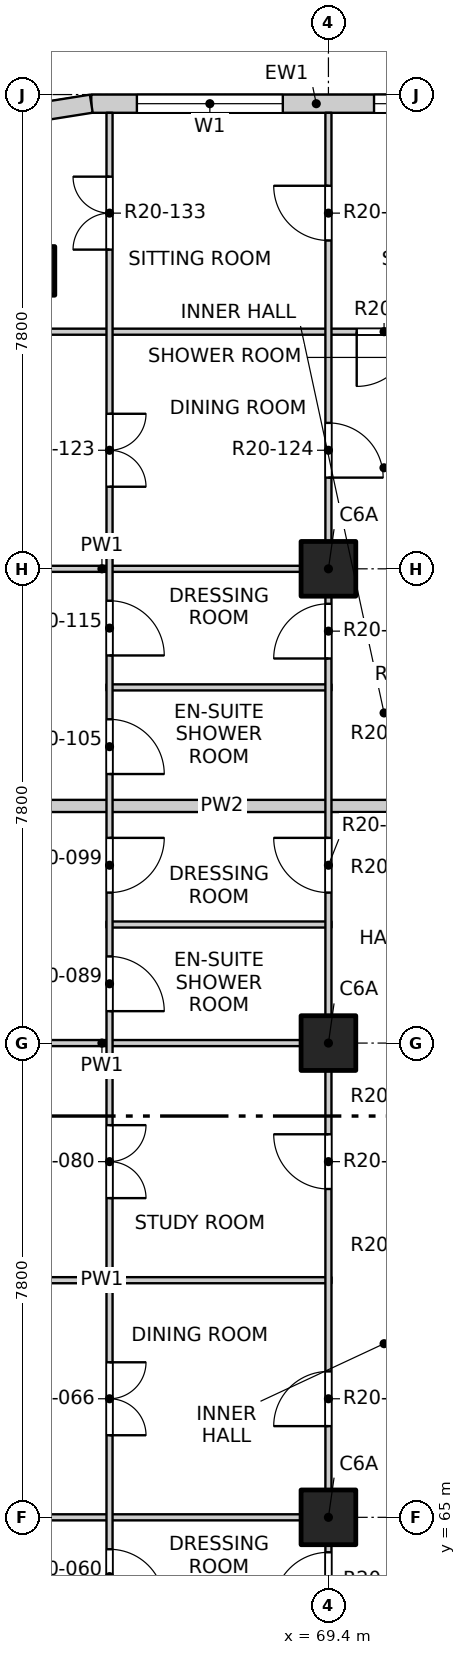
"""IFC4 building model, lengths in metres.
Left out: names, types, materials, properties, quantities, classifications, styles, units other than length and angle.
Written with IfcOpenShell. Run it as: python <this file> out.ifc"""

import sys

from ifc_helpers import new_model, si_unit, direction, frame, frame_2d, origin, origin_2d, place, context, subcontext, project, spatial, rectangle, extrude, element, fill, save


model = new_model("IFC4")
c1 = context("Model", 3, precision=1e-05, world=origin(), true_north=direction((0.0, 1.0)))
c2 = subcontext(c1, "Body", "Model", "MODEL_VIEW")
j1 = project(units=[si_unit("LENGTHUNIT", "METRE"), si_unit("PLANEANGLEUNIT", "RADIAN")], contexts=[c1])
p1 = place(None, origin())
s1 = spatial("IfcSite", under=j1, at=p1, CompositionType="ELEMENT")
p2 = place(p1, origin())
s2 = spatial("IfcBuilding", under=s1, at=p2, CompositionType="ELEMENT")
p3 = place(p2, frame((0.0, 0.0, 210.9)))
s3 = spatial("IfcBuildingStorey", under=s2, at=p3, CompositionType="ELEMENT", Elevation=210.9)
p4 = place(p3, frame((64.5, 85.5, -0.25), z_axis=(0.0, 0.0, 1.0), x_axis=(1.0, 0.0, 0.0)))
e1 = element("IfcColumn", 1, at=p4, inside=s3, PredefinedType="COLUMN", context=c2, shape_type="SweptSolid", body=[
    extrude(rectangle(XDim=0.8, YDim=0.8, at=origin_2d()), origin(), (0.0, 0.0, 1.0), 3.4),
])
for number, where, z_axis, x_axis in (
    (2, (69.4, 65.0, -0.25), (0.0, 0.0, 1.0), (1.0, 0.0, 0.0)),
    (3, (69.4, 72.8, -0.25), (0.0, 0.0, 1.0), (1.0, 0.0, 0.0)),
    (4, (69.4, 80.6, -0.25), (0.0, 0.0, 1.0), (1.0, 0.0, 0.0)),
):
    element("IfcColumn", number, at=place(p3, frame(where, z_axis=z_axis, x_axis=x_axis)), inside=s3, PredefinedType="COLUMN", context=c2, shape_type="SweptSolid", body=[
        extrude(rectangle(XDim=0.9, YDim=0.9, at=origin_2d()), origin(), (0.0, 0.0, 1.0), 3.4),
    ])
p5 = place(p3, frame((65.5, 88.25, 0.0), z_axis=(0.0, 0.0, 1.0), x_axis=(1.0, 0.0, 0.0)))
e5 = element("IfcWall", 5, at=p5, inside=s3, PredefinedType="SOLIDWALL", context=c2, shape_type="SweptSolid", body=[
    extrude(rectangle(XDim=7.4, YDim=0.3, at=frame_2d((3.7, 0.0))), origin(), (0.0, 0.0, 1.0), 2.7),
])
p6 = place(p5, frame((0.75, 0.0, 0.9)))
e6 = element("IfcOpeningElement", 6, at=p6, cuts=e5, PredefinedType="OPENING", context=c2, shape_type="SweptSolid", body=[
    extrude(rectangle(XDim=2.4, YDim=1.8, at=frame_2d((1.2, 0.9))), frame((0.0, 0.16, 0.0), z_axis=(0.0, -1.0, 0.0), x_axis=(1.0, 0.0, 0.0)), (0.0, 0.0, 1.0), 0.32),
])
p7 = place(p5, frame((4.65, 0.0, 0.9)))
e7 = element("IfcOpeningElement", 7, at=p7, cuts=e5, PredefinedType="OPENING", context=c2, shape_type="SweptSolid", body=[
    extrude(rectangle(XDim=2.4, YDim=1.8, at=frame_2d((1.2, 0.9))), frame((0.0, 0.16, 0.0), z_axis=(0.0, -1.0, 0.0), x_axis=(1.0, 0.0, 0.0)), (0.0, 0.0, 1.0), 0.32),
])
p8 = place(p3, frame((65.5, 88.25, 0.0), z_axis=(0.0, 0.0, 1.0), x_axis=(-0.987678452879, -0.156496880861, 0.0)))
e8 = element("IfcWall", 8, at=p8, inside=s3, PredefinedType="SOLIDWALL", context=c2, shape_type="SweptSolid", body=[
    extrude(rectangle(XDim=1.173, YDim=0.3, at=frame_2d((0.586, 0.0))), origin(), (0.0, 0.0, 1.0), 2.7),
])
p9 = place(p3, frame((61.9, 65.0, 0.0), z_axis=(0.0, 0.0, 1.0), x_axis=(1.0, 0.0, 0.0)))
e9 = element("IfcWall", 9, at=p9, inside=s3, PredefinedType="PARTITIONING", context=c2, shape_type="SweptSolid", body=[
    extrude(rectangle(XDim=7.55, YDim=0.1, at=frame_2d((3.775, 0.0))), origin(), (0.0, 0.0, 1.0), 3.15),
])
p10 = place(p3, frame((61.9, 68.9, 0.0), z_axis=(0.0, 0.0, 1.0), x_axis=(1.0, 0.0, 0.0)))
e10 = element("IfcWall", 10, at=p10, inside=s3, PredefinedType="PARTITIONING", context=c2, shape_type="SweptSolid", body=[
    extrude(rectangle(XDim=7.55, YDim=0.1, at=frame_2d((3.775, 0.0))), origin(), (0.0, 0.0, 1.0), 2.55),
])
p11 = place(p3, frame((61.9, 72.8, 0.0), z_axis=(0.0, 0.0, 1.0), x_axis=(1.0, 0.0, 0.0)))
e11 = element("IfcWall", 11, at=p11, inside=s3, PredefinedType="PARTITIONING", context=c2, shape_type="SweptSolid", body=[
    extrude(rectangle(XDim=7.55, YDim=0.1, at=frame_2d((3.775, 0.0))), origin(), (0.0, 0.0, 1.0), 3.15),
])
p12 = place(p3, frame((65.75, 74.75, 0.0), z_axis=(0.0, 0.0, 1.0), x_axis=(1.0, 0.0, 0.0)))
e12 = element("IfcWall", 12, at=p12, inside=s3, PredefinedType="PARTITIONING", context=c2, shape_type="SweptSolid", body=[
    extrude(rectangle(XDim=3.7, YDim=0.1, at=frame_2d((1.85, 0.0))), origin(), (0.0, 0.0, 1.0), 3.15),
])
p13 = place(p3, frame((61.9, 76.7, 0.0), z_axis=(0.0, 0.0, 1.0), x_axis=(1.0, 0.0, 0.0)))
e13 = element("IfcWall", 13, at=p13, inside=s3, PredefinedType="PARTITIONING", context=c2, shape_type="SweptSolid", body=[
    extrude(rectangle(XDim=11.5, YDim=0.2, at=frame_2d((5.75, 0.0))), origin(), (0.0, 0.0, 1.0), 2.55),
])
p14 = place(p3, frame((65.75, 78.65, 0.0), z_axis=(0.0, 0.0, 1.0), x_axis=(1.0, 0.0, 0.0)))
e14 = element("IfcWall", 14, at=p14, inside=s3, PredefinedType="PARTITIONING", context=c2, shape_type="SweptSolid", body=[
    extrude(rectangle(XDim=3.7, YDim=0.1, at=frame_2d((1.85, 0.0))), origin(), (0.0, 0.0, 1.0), 3.15),
])
p15 = place(p3, frame((61.9, 80.6, 0.0), z_axis=(0.0, 0.0, 1.0), x_axis=(1.0, 0.0, 0.0)))
e15 = element("IfcWall", 15, at=p15, inside=s3, PredefinedType="PARTITIONING", context=c2, shape_type="SweptSolid", body=[
    extrude(rectangle(XDim=7.55, YDim=0.1, at=frame_2d((3.775, 0.0))), origin(), (0.0, 0.0, 1.0), 3.15),
])
p16 = place(p3, frame((61.9, 84.5, 0.0), z_axis=(0.0, 0.0, 1.0), x_axis=(1.0, 0.0, 0.0)))
e16 = element("IfcWall", 16, at=p16, inside=s3, PredefinedType="PARTITIONING", context=c2, shape_type="SweptSolid", body=[
    extrude(rectangle(XDim=11.5, YDim=0.1, at=frame_2d((5.75, 0.0))), origin(), (0.0, 0.0, 1.0), 3.15),
])
p17 = place(p16, frame((7.965, 0.0, 0.0)))
e17 = element("IfcOpeningElement", 17, at=p17, cuts=e16, PredefinedType="OPENING", context=c2, shape_type="SweptSolid", body=[
    extrude(rectangle(XDim=0.9, YDim=2.1, at=frame_2d((0.45, 1.05))), frame((0.0, 0.06, 0.0), z_axis=(0.0, -1.0, 0.0), x_axis=(1.0, 0.0, 0.0)), (0.0, 0.0, 1.0), 0.12),
])
p18 = place(p3, frame((65.8, 61.2, 0.0), z_axis=(0.0, 0.0, 1.0), x_axis=(0.0, 1.0, 0.0)))
e18 = element("IfcWall", 18, at=p18, inside=s3, PredefinedType="PARTITIONING", context=c2, shape_type="SweptSolid", body=[
    extrude(rectangle(XDim=26.9, YDim=0.1, at=frame_2d((13.45, 0.0))), origin(), (0.0, 0.0, 1.0), 3.15),
])
p19 = place(p18, frame((0.425, 0.0, 0.0)))
e19 = element("IfcOpeningElement", 19, at=p19, cuts=e18, PredefinedType="OPENING", context=c2, shape_type="SweptSolid", body=[
    extrude(rectangle(XDim=0.9, YDim=2.1, at=frame_2d((0.45, 1.05))), frame((0.0, 0.06, 0.0), z_axis=(0.0, -1.0, 0.0), x_axis=(1.0, 0.0, 0.0)), (0.0, 0.0, 1.0), 0.12),
])
p20 = place(p18, frame((2.375, 0.0, 0.0)))
e20 = element("IfcOpeningElement", 20, at=p20, cuts=e18, PredefinedType="OPENING", context=c2, shape_type="SweptSolid", body=[
    extrude(rectangle(XDim=0.9, YDim=2.1, at=frame_2d((0.45, 1.05))), frame((0.0, 0.06, 0.0), z_axis=(0.0, -1.0, 0.0), x_axis=(1.0, 0.0, 0.0)), (0.0, 0.0, 1.0), 0.12),
])
p21 = place(p18, frame((5.15, 0.0, 0.0)))
e21 = element("IfcOpeningElement", 21, at=p21, cuts=e18, PredefinedType="OPENING", context=c2, shape_type="SweptSolid", body=[
    extrude(rectangle(XDim=1.2, YDim=2.1, at=frame_2d((0.6, 1.05))), frame((0.0, 0.06, 0.0), z_axis=(0.0, -1.0, 0.0), x_axis=(1.0, 0.0, 0.0)), (0.0, 0.0, 1.0), 0.12),
])
p22 = place(p18, frame((9.05, 0.0, 0.0)))
e22 = element("IfcOpeningElement", 22, at=p22, cuts=e18, PredefinedType="OPENING", context=c2, shape_type="SweptSolid", body=[
    extrude(rectangle(XDim=1.2, YDim=2.1, at=frame_2d((0.6, 1.05))), frame((0.0, 0.06, 0.0), z_axis=(0.0, -1.0, 0.0), x_axis=(1.0, 0.0, 0.0)), (0.0, 0.0, 1.0), 0.12),
])
p23 = place(p18, frame((12.125, 0.0, 0.0)))
e23 = element("IfcOpeningElement", 23, at=p23, cuts=e18, PredefinedType="OPENING", context=c2, shape_type="SweptSolid", body=[
    extrude(rectangle(XDim=0.9, YDim=2.1, at=frame_2d((0.45, 1.05))), frame((0.0, 0.06, 0.0), z_axis=(0.0, -1.0, 0.0), x_axis=(1.0, 0.0, 0.0)), (0.0, 0.0, 1.0), 0.12),
])
p24 = place(p18, frame((14.075, 0.0, 0.0)))
e24 = element("IfcOpeningElement", 24, at=p24, cuts=e18, PredefinedType="OPENING", context=c2, shape_type="SweptSolid", body=[
    extrude(rectangle(XDim=0.9, YDim=2.1, at=frame_2d((0.45, 1.05))), frame((0.0, 0.06, 0.0), z_axis=(0.0, -1.0, 0.0), x_axis=(1.0, 0.0, 0.0)), (0.0, 0.0, 1.0), 0.12),
])
p25 = place(p18, frame((16.025, 0.0, 0.0)))
e25 = element("IfcOpeningElement", 25, at=p25, cuts=e18, PredefinedType="OPENING", context=c2, shape_type="SweptSolid", body=[
    extrude(rectangle(XDim=0.9, YDim=2.1, at=frame_2d((0.45, 1.05))), frame((0.0, 0.06, 0.0), z_axis=(0.0, -1.0, 0.0), x_axis=(1.0, 0.0, 0.0)), (0.0, 0.0, 1.0), 0.12),
])
p26 = place(p18, frame((17.975, 0.0, 0.0)))
e26 = element("IfcOpeningElement", 26, at=p26, cuts=e18, PredefinedType="OPENING", context=c2, shape_type="SweptSolid", body=[
    extrude(rectangle(XDim=0.9, YDim=2.1, at=frame_2d((0.45, 1.05))), frame((0.0, 0.06, 0.0), z_axis=(0.0, -1.0, 0.0), x_axis=(1.0, 0.0, 0.0)), (0.0, 0.0, 1.0), 0.12),
])
p27 = place(p18, frame((20.75, 0.0, 0.0)))
e27 = element("IfcOpeningElement", 27, at=p27, cuts=e18, PredefinedType="OPENING", context=c2, shape_type="SweptSolid", body=[
    extrude(rectangle(XDim=1.2, YDim=2.1, at=frame_2d((0.6, 1.05))), frame((0.0, 0.06, 0.0), z_axis=(0.0, -1.0, 0.0), x_axis=(1.0, 0.0, 0.0)), (0.0, 0.0, 1.0), 0.12),
])
p28 = place(p18, frame((24.65, 0.0, 0.0)))
e28 = element("IfcOpeningElement", 28, at=p28, cuts=e18, PredefinedType="OPENING", context=c2, shape_type="SweptSolid", body=[
    extrude(rectangle(XDim=1.2, YDim=2.1, at=frame_2d((0.6, 1.05))), frame((0.0, 0.06, 0.0), z_axis=(0.0, -1.0, 0.0), x_axis=(1.0, 0.0, 0.0)), (0.0, 0.0, 1.0), 0.12),
])
p29 = place(p3, frame((69.4, 41.9, 0.0), z_axis=(0.0, 0.0, 1.0), x_axis=(0.0, 1.0, 0.0)))
e29 = element("IfcWall", 29, at=p29, inside=s3, PredefinedType="PARTITIONING", context=c2, shape_type="SweptSolid", body=[
    extrude(rectangle(XDim=46.2, YDim=0.1, at=frame_2d((23.1, 0.0))), origin(), (0.0, 0.0, 1.0), 3.15),
])
p30 = place(p29, frame((1.2, 0.0, 0.0)))
e30 = element("IfcOpeningElement", 30, at=p30, cuts=e29, PredefinedType="OPENING", context=c2, shape_type="SweptSolid", body=[
    extrude(rectangle(XDim=0.9, YDim=2.1, at=frame_2d((0.45, 1.05))), frame((0.0, 0.06, 0.0), z_axis=(0.0, -1.0, 0.0), x_axis=(1.0, 0.0, 0.0)), (0.0, 0.0, 1.0), 0.12),
])
p31 = place(p29, frame((5.1, 0.0, 0.0)))
e31 = element("IfcOpeningElement", 31, at=p31, cuts=e29, PredefinedType="OPENING", context=c2, shape_type="SweptSolid", body=[
    extrude(rectangle(XDim=0.9, YDim=2.1, at=frame_2d((0.45, 1.05))), frame((0.0, 0.06, 0.0), z_axis=(0.0, -1.0, 0.0), x_axis=(1.0, 0.0, 0.0)), (0.0, 0.0, 1.0), 0.12),
])
p32 = place(p29, frame((9.975, 0.0, 0.0)))
e32 = element("IfcOpeningElement", 32, at=p32, cuts=e29, PredefinedType="OPENING", context=c2, shape_type="SweptSolid", body=[
    extrude(rectangle(XDim=0.9, YDim=2.1, at=frame_2d((0.45, 1.05))), frame((0.0, 0.06, 0.0), z_axis=(0.0, -1.0, 0.0), x_axis=(1.0, 0.0, 0.0)), (0.0, 0.0, 1.0), 0.12),
])
p33 = place(p29, frame((12.9, 0.0, 0.0)))
e33 = element("IfcOpeningElement", 33, at=p33, cuts=e29, PredefinedType="OPENING", context=c2, shape_type="SweptSolid", body=[
    extrude(rectangle(XDim=0.9, YDim=2.1, at=frame_2d((0.45, 1.05))), frame((0.0, 0.06, 0.0), z_axis=(0.0, -1.0, 0.0), x_axis=(1.0, 0.0, 0.0)), (0.0, 0.0, 1.0), 0.12),
])
p34 = place(p29, frame((17.775, 0.0, 0.0)))
e34 = element("IfcOpeningElement", 34, at=p34, cuts=e29, PredefinedType="OPENING", context=c2, shape_type="SweptSolid", body=[
    extrude(rectangle(XDim=0.9, YDim=2.1, at=frame_2d((0.45, 1.05))), frame((0.0, 0.06, 0.0), z_axis=(0.0, -1.0, 0.0), x_axis=(1.0, 0.0, 0.0)), (0.0, 0.0, 1.0), 0.12),
])
p35 = place(p29, frame((21.625, 0.0, 0.0)))
e35 = element("IfcOpeningElement", 35, at=p35, cuts=e29, PredefinedType="OPENING", context=c2, shape_type="SweptSolid", body=[
    extrude(rectangle(XDim=0.9, YDim=2.1, at=frame_2d((0.45, 1.05))), frame((0.0, 0.06, 0.0), z_axis=(0.0, -1.0, 0.0), x_axis=(1.0, 0.0, 0.0)), (0.0, 0.0, 1.0), 0.12),
])
p36 = place(p29, frame((24.6, 0.0, 0.0)))
e36 = element("IfcOpeningElement", 36, at=p36, cuts=e29, PredefinedType="OPENING", context=c2, shape_type="SweptSolid", body=[
    extrude(rectangle(XDim=0.9, YDim=2.1, at=frame_2d((0.45, 1.05))), frame((0.0, 0.06, 0.0), z_axis=(0.0, -1.0, 0.0), x_axis=(1.0, 0.0, 0.0)), (0.0, 0.0, 1.0), 0.12),
])
p37 = place(p29, frame((28.5, 0.0, 0.0)))
e37 = element("IfcOpeningElement", 37, at=p37, cuts=e29, PredefinedType="OPENING", context=c2, shape_type="SweptSolid", body=[
    extrude(rectangle(XDim=0.9, YDim=2.1, at=frame_2d((0.45, 1.05))), frame((0.0, 0.06, 0.0), z_axis=(0.0, -1.0, 0.0), x_axis=(1.0, 0.0, 0.0)), (0.0, 0.0, 1.0), 0.12),
])
p38 = place(p29, frame((33.375, 0.0, 0.0)))
e38 = element("IfcOpeningElement", 38, at=p38, cuts=e29, PredefinedType="OPENING", context=c2, shape_type="SweptSolid", body=[
    extrude(rectangle(XDim=0.9, YDim=2.1, at=frame_2d((0.45, 1.05))), frame((0.0, 0.06, 0.0), z_axis=(0.0, -1.0, 0.0), x_axis=(1.0, 0.0, 0.0)), (0.0, 0.0, 1.0), 0.12),
])
p39 = place(p29, frame((37.225, 0.0, 0.0)))
e39 = element("IfcOpeningElement", 39, at=p39, cuts=e29, PredefinedType="OPENING", context=c2, shape_type="SweptSolid", body=[
    extrude(rectangle(XDim=0.9, YDim=2.1, at=frame_2d((0.45, 1.05))), frame((0.0, 0.06, 0.0), z_axis=(0.0, -1.0, 0.0), x_axis=(1.0, 0.0, 0.0)), (0.0, 0.0, 1.0), 0.12),
])
p40 = place(p29, frame((40.2, 0.0, 0.0)))
e40 = element("IfcOpeningElement", 40, at=p40, cuts=e29, PredefinedType="OPENING", context=c2, shape_type="SweptSolid", body=[
    extrude(rectangle(XDim=0.9, YDim=2.1, at=frame_2d((0.45, 1.05))), frame((0.0, 0.06, 0.0), z_axis=(0.0, -1.0, 0.0), x_axis=(1.0, 0.0, 0.0)), (0.0, 0.0, 1.0), 0.12),
])
p41 = place(p29, frame((44.1, 0.0, 0.0)))
e41 = element("IfcOpeningElement", 41, at=p41, cuts=e29, PredefinedType="OPENING", context=c2, shape_type="SweptSolid", body=[
    extrude(rectangle(XDim=0.9, YDim=2.1, at=frame_2d((0.45, 1.05))), frame((0.0, 0.06, 0.0), z_axis=(0.0, -1.0, 0.0), x_axis=(1.0, 0.0, 0.0)), (0.0, 0.0, 1.0), 0.12),
])
p42 = place(p6, origin())
e42 = element("IfcWindow", 42, at=p42, inside=s3, PartitioningType="DOUBLE_PANEL_VERTICAL", PredefinedType="WINDOW", context=c2, shape_type="SweptSolid", body=[
    extrude(rectangle(XDim=2.4, YDim=1.8, at=frame_2d((1.2, 0.9))), frame((0.0, 0.03, 0.0), z_axis=(0.0, -1.0, 0.0), x_axis=(1.0, 0.0, 0.0)), (0.0, 0.0, 1.0), 0.06),
])
fill(e6, e42)
p43 = place(p7, origin())
e43 = element("IfcWindow", 43, at=p43, inside=s3, PartitioningType="DOUBLE_PANEL_VERTICAL", PredefinedType="WINDOW", context=c2, shape_type="SweptSolid", body=[
    extrude(rectangle(XDim=2.4, YDim=1.8, at=frame_2d((1.2, 0.9))), frame((0.0, 0.03, 0.0), z_axis=(0.0, -1.0, 0.0), x_axis=(1.0, 0.0, 0.0)), (0.0, 0.0, 1.0), 0.06),
])
fill(e7, e43)
p44 = place(p35, origin())
e44 = element("IfcDoor", 44, at=p44, inside=s3, OperationType="SINGLE_SWING_LEFT", PredefinedType="DOOR", context=c2, shape_type="SweptSolid", body=[
    extrude(rectangle(XDim=0.9, YDim=2.1, at=frame_2d((0.45, 1.05))), frame((0.0, 0.025, 0.0), z_axis=(0.0, -1.0, 0.0), x_axis=(1.0, 0.0, 0.0)), (0.0, 0.0, 1.0), 0.05),
])
fill(e35, e44)
p45 = place(p20, origin())
e45 = element("IfcDoor", 45, at=p45, inside=s3, OperationType="SINGLE_SWING_RIGHT", PredefinedType="DOOR", context=c2, shape_type="SweptSolid", body=[
    extrude(rectangle(XDim=0.9, YDim=2.1, at=frame_2d((0.45, 1.05))), frame((0.0, 0.025, 0.0), z_axis=(0.0, -1.0, 0.0), x_axis=(1.0, 0.0, 0.0)), (0.0, 0.0, 1.0), 0.05),
])
fill(e20, e45)
p46 = place(p21, origin())
e46 = element("IfcDoor", 46, at=p46, inside=s3, OperationType="DOUBLE_DOOR_SINGLE_SWING", PredefinedType="DOOR", context=c2, shape_type="SweptSolid", body=[
    extrude(rectangle(XDim=1.2, YDim=2.1, at=frame_2d((0.6, 1.05))), frame((0.0, 0.025, 0.0), z_axis=(0.0, -1.0, 0.0), x_axis=(1.0, 0.0, 0.0)), (0.0, 0.0, 1.0), 0.05),
])
fill(e21, e46)
p47 = place(p36, origin())
e47 = element("IfcDoor", 47, at=p47, inside=s3, OperationType="SINGLE_SWING_LEFT", PredefinedType="DOOR", context=c2, shape_type="SweptSolid", body=[
    extrude(rectangle(XDim=0.9, YDim=2.1, at=frame_2d((0.45, 1.05))), frame((0.0, 0.025, 0.0), z_axis=(0.0, -1.0, 0.0), x_axis=(1.0, 0.0, 0.0)), (0.0, 0.0, 1.0), 0.05),
])
fill(e36, e47)
p48 = place(p22, origin())
e48 = element("IfcDoor", 48, at=p48, inside=s3, OperationType="DOUBLE_DOOR_SINGLE_SWING", PredefinedType="DOOR", context=c2, shape_type="SweptSolid", body=[
    extrude(rectangle(XDim=1.2, YDim=2.1, at=frame_2d((0.6, 1.05))), frame((0.0, 0.025, 0.0), z_axis=(0.0, -1.0, 0.0), x_axis=(1.0, 0.0, 0.0)), (0.0, 0.0, 1.0), 0.05),
])
fill(e22, e48)
p49 = place(p37, origin())
e49 = element("IfcDoor", 49, at=p49, inside=s3, OperationType="SINGLE_SWING_RIGHT", PredefinedType="DOOR", context=c2, shape_type="SweptSolid", body=[
    extrude(rectangle(XDim=0.9, YDim=2.1, at=frame_2d((0.45, 1.05))), frame((0.0, 0.025, 0.0), z_axis=(0.0, -1.0, 0.0), x_axis=(1.0, 0.0, 0.0)), (0.0, 0.0, 1.0), 0.05),
])
fill(e37, e49)
p50 = place(p23, origin())
e50 = element("IfcDoor", 50, at=p50, inside=s3, OperationType="SINGLE_SWING_RIGHT", PredefinedType="DOOR", context=c2, shape_type="SweptSolid", body=[
    extrude(rectangle(XDim=0.9, YDim=2.1, at=frame_2d((0.45, 1.05))), frame((0.0, 0.025, 0.0), z_axis=(0.0, -1.0, 0.0), x_axis=(1.0, 0.0, 0.0)), (0.0, 0.0, 1.0), 0.05),
])
fill(e23, e50)
p51 = place(p24, origin())
e51 = element("IfcDoor", 51, at=p51, inside=s3, OperationType="SINGLE_SWING_LEFT", PredefinedType="DOOR", context=c2, shape_type="SweptSolid", body=[
    extrude(rectangle(XDim=0.9, YDim=2.1, at=frame_2d((0.45, 1.05))), frame((0.0, 0.025, 0.0), z_axis=(0.0, -1.0, 0.0), x_axis=(1.0, 0.0, 0.0)), (0.0, 0.0, 1.0), 0.05),
])
fill(e24, e51)
p52 = place(p38, origin())
e52 = element("IfcDoor", 52, at=p52, inside=s3, OperationType="SINGLE_SWING_RIGHT", PredefinedType="DOOR", context=c2, shape_type="SweptSolid", body=[
    extrude(rectangle(XDim=0.9, YDim=2.1, at=frame_2d((0.45, 1.05))), frame((0.0, 0.025, 0.0), z_axis=(0.0, -1.0, 0.0), x_axis=(1.0, 0.0, 0.0)), (0.0, 0.0, 1.0), 0.05),
])
fill(e38, e52)
p53 = place(p25, origin())
e53 = element("IfcDoor", 53, at=p53, inside=s3, OperationType="SINGLE_SWING_RIGHT", PredefinedType="DOOR", context=c2, shape_type="SweptSolid", body=[
    extrude(rectangle(XDim=0.9, YDim=2.1, at=frame_2d((0.45, 1.05))), frame((0.0, 0.025, 0.0), z_axis=(0.0, -1.0, 0.0), x_axis=(1.0, 0.0, 0.0)), (0.0, 0.0, 1.0), 0.05),
])
fill(e25, e53)
p54 = place(p39, origin())
e54 = element("IfcDoor", 54, at=p54, inside=s3, OperationType="SINGLE_SWING_LEFT", PredefinedType="DOOR", context=c2, shape_type="SweptSolid", body=[
    extrude(rectangle(XDim=0.9, YDim=2.1, at=frame_2d((0.45, 1.05))), frame((0.0, 0.025, 0.0), z_axis=(0.0, -1.0, 0.0), x_axis=(1.0, 0.0, 0.0)), (0.0, 0.0, 1.0), 0.05),
])
fill(e39, e54)
p55 = place(p26, origin())
e55 = element("IfcDoor", 55, at=p55, inside=s3, OperationType="SINGLE_SWING_RIGHT", PredefinedType="DOOR", context=c2, shape_type="SweptSolid", body=[
    extrude(rectangle(XDim=0.9, YDim=2.1, at=frame_2d((0.45, 1.05))), frame((0.0, 0.025, 0.0), z_axis=(0.0, -1.0, 0.0), x_axis=(1.0, 0.0, 0.0)), (0.0, 0.0, 1.0), 0.05),
])
fill(e26, e55)
p56 = place(p27, origin())
e56 = element("IfcDoor", 56, at=p56, inside=s3, OperationType="DOUBLE_DOOR_SINGLE_SWING", PredefinedType="DOOR", context=c2, shape_type="SweptSolid", body=[
    extrude(rectangle(XDim=1.2, YDim=2.1, at=frame_2d((0.6, 1.05))), frame((0.0, 0.025, 0.0), z_axis=(0.0, -1.0, 0.0), x_axis=(1.0, 0.0, 0.0)), (0.0, 0.0, 1.0), 0.05),
])
fill(e27, e56)
p57 = place(p40, origin())
e57 = element("IfcDoor", 57, at=p57, inside=s3, OperationType="SINGLE_SWING_RIGHT", PredefinedType="DOOR", context=c2, shape_type="SweptSolid", body=[
    extrude(rectangle(XDim=0.9, YDim=2.1, at=frame_2d((0.45, 1.05))), frame((0.0, 0.025, 0.0), z_axis=(0.0, -1.0, 0.0), x_axis=(1.0, 0.0, 0.0)), (0.0, 0.0, 1.0), 0.05),
])
fill(e40, e57)
p58 = place(p17, origin())
e58 = element("IfcDoor", 58, at=p58, inside=s3, OperationType="SINGLE_SWING_RIGHT", PredefinedType="DOOR", context=c2, shape_type="SweptSolid", body=[
    extrude(rectangle(XDim=0.9, YDim=2.1, at=frame_2d((0.45, 1.05))), frame((0.0, 0.025, 0.0), z_axis=(0.0, -1.0, 0.0), x_axis=(1.0, 0.0, 0.0)), (0.0, 0.0, 1.0), 0.05),
])
fill(e17, e58)
p59 = place(p28, origin())
e59 = element("IfcDoor", 59, at=p59, inside=s3, OperationType="DOUBLE_DOOR_SINGLE_SWING", PredefinedType="DOOR", context=c2, shape_type="SweptSolid", body=[
    extrude(rectangle(XDim=1.2, YDim=2.1, at=frame_2d((0.6, 1.05))), frame((0.0, 0.025, 0.0), z_axis=(0.0, -1.0, 0.0), x_axis=(1.0, 0.0, 0.0)), (0.0, 0.0, 1.0), 0.05),
])
fill(e28, e59)
p60 = place(p41, origin())
e60 = element("IfcDoor", 60, at=p60, inside=s3, OperationType="SINGLE_SWING_RIGHT", PredefinedType="DOOR", context=c2, shape_type="SweptSolid", body=[
    extrude(rectangle(XDim=0.9, YDim=2.1, at=frame_2d((0.45, 1.05))), frame((0.0, 0.025, 0.0), z_axis=(0.0, -1.0, 0.0), x_axis=(1.0, 0.0, 0.0)), (0.0, 0.0, 1.0), 0.05),
])
fill(e41, e60)
save(model, sys.argv[1])
